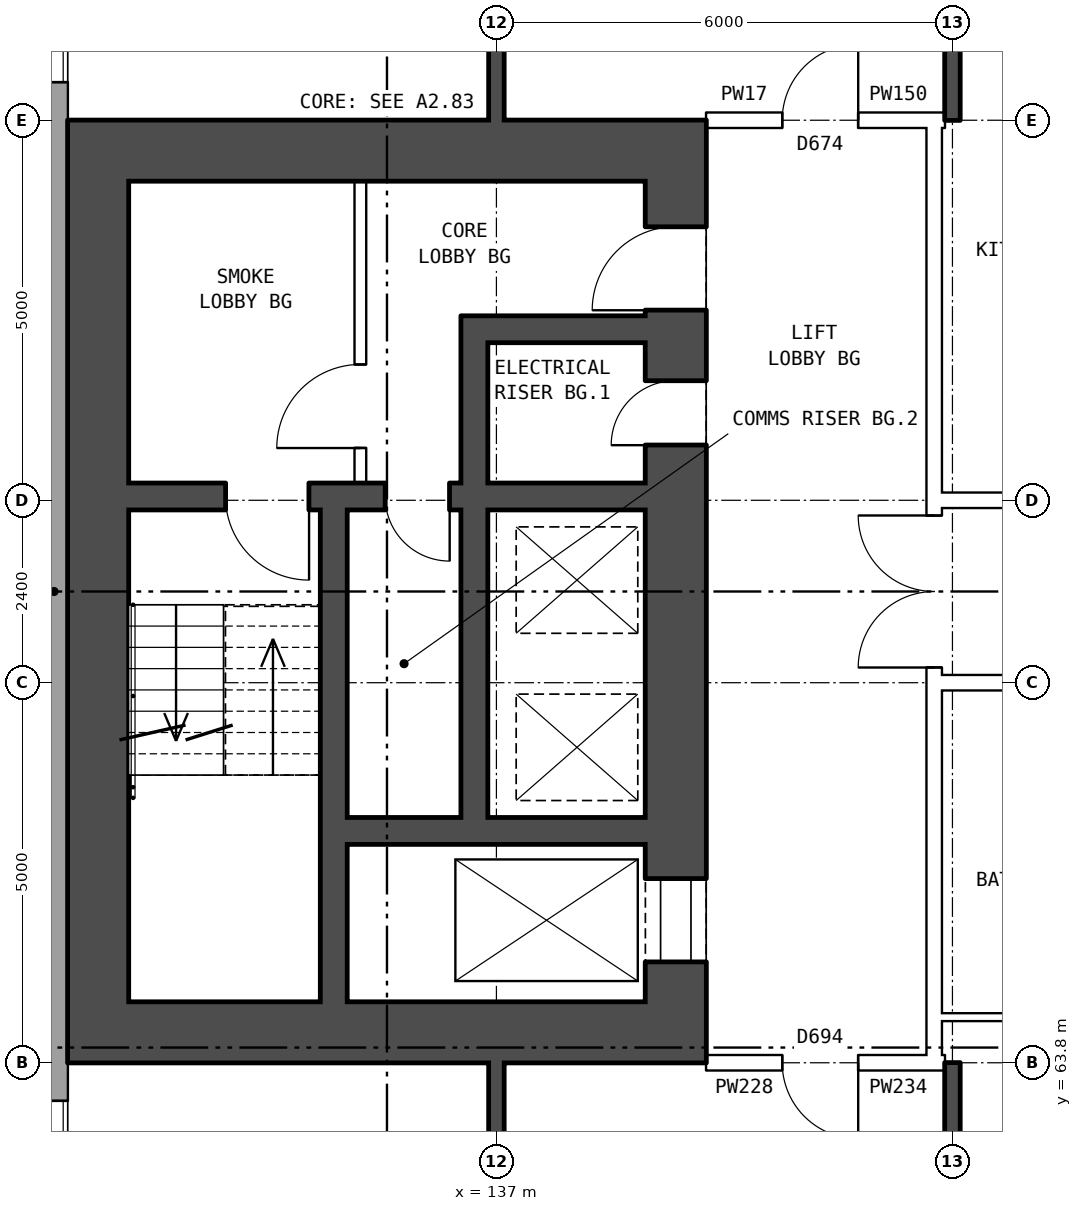
"""IFC4 building model, lengths in metres.
Left out: names, types, materials, properties, quantities, classifications, styles, units other than length and angle.
Written with IfcOpenShell. Run it as: python <this file> out.ifc"""

import sys

from ifc_helpers import new_model, si_unit, direction, frame, frame_2d, origin, place, context, subcontext, project, spatial, rectangle, extrude, element, fill, save


model = new_model("IFC4")
c1 = context("Model", 3, precision=1e-05, world=origin(), true_north=direction((0.0, 1.0)))
c2 = subcontext(c1, "Body", "Model", "MODEL_VIEW")
j1 = project(units=[si_unit("LENGTHUNIT", "METRE"), si_unit("PLANEANGLEUNIT", "RADIAN")], contexts=[c1])
p1 = place(None, origin())
s1 = spatial("IfcSite", under=j1, at=p1, CompositionType="ELEMENT")
p2 = place(p1, origin())
s2 = spatial("IfcBuilding", under=s1, at=p2, CompositionType="ELEMENT")
p3 = place(p2, frame((0.0, 0.0, 50.5)))
s3 = spatial("IfcBuildingStorey", under=s2, at=p3, CompositionType="ELEMENT", Elevation=50.5)
p4 = place(p3, frame((131.18, 82.925, 0.0), z_axis=(0.0, 0.0, 1.0), x_axis=(0.0, -1.0, 0.0)))
e1 = element("IfcWall", 1, at=p4, inside=s3, PredefinedType="STANDARD", context=c2, shape_type="SweptSolid", body=[
    extrude(rectangle(XDim=25.851, YDim=0.36, at=frame_2d((12.925, 0.0))), origin(), (0.0, 0.0, 1.0), 2.85),
])
p5 = place(p4, frame((1.625, 0.0, 0.8)))
e2 = element("IfcOpeningElement", 2, at=p5, cuts=e1, PredefinedType="OPENING", context=c2, shape_type="SweptSolid", body=[
    extrude(rectangle(XDim=1.6, YDim=1.8, at=frame_2d((0.8, 0.9))), frame((0.0, 0.19, 0.0), z_axis=(0.0, -1.0, 0.0), x_axis=(1.0, 0.0, 0.0)), (0.0, 0.0, 1.0), 0.38),
])
p6 = place(p4, frame((4.625, 0.0, 0.8)))
e3 = element("IfcOpeningElement", 3, at=p6, cuts=e1, PredefinedType="OPENING", context=c2, shape_type="SweptSolid", body=[
    extrude(rectangle(XDim=1.6, YDim=1.8, at=frame_2d((0.8, 0.9))), frame((0.0, 0.19, 0.0), z_axis=(0.0, -1.0, 0.0), x_axis=(1.0, 0.0, 0.0)), (0.0, 0.0, 1.0), 0.38),
])
p7 = place(p4, frame((19.625, 0.0, 0.8)))
e4 = element("IfcOpeningElement", 4, at=p7, cuts=e1, PredefinedType="OPENING", context=c2, shape_type="SweptSolid", body=[
    extrude(rectangle(XDim=1.6, YDim=1.8, at=frame_2d((0.8, 0.9))), frame((0.0, 0.19, 0.0), z_axis=(0.0, -1.0, 0.0), x_axis=(1.0, 0.0, 0.0)), (0.0, 0.0, 1.0), 0.38),
])
p8 = place(p4, frame((22.625, 0.0, 0.8)))
e5 = element("IfcOpeningElement", 5, at=p8, cuts=e1, PredefinedType="OPENING", context=c2, shape_type="SweptSolid", body=[
    extrude(rectangle(XDim=1.6, YDim=1.8, at=frame_2d((0.8, 0.9))), frame((0.0, 0.19, 0.0), z_axis=(0.0, -1.0, 0.0), x_axis=(1.0, 0.0, 0.0)), (0.0, 0.0, 1.0), 0.38),
])
p9 = place(p3, frame((139.36, 64.6, 0.0), z_axis=(0.0, 0.0, 1.0), x_axis=(0.0, 1.0, 0.0)))
e6 = element("IfcWall", 6, at=p9, inside=s3, PredefinedType="SHEAR", context=c2, shape_type="SweptSolid", body=[
    extrude(rectangle(XDim=10.8, YDim=0.8, at=frame_2d((5.4, 0.0))), origin(), (0.0, 0.0, 1.0), 2.85),
])
p10 = place(p9, frame((0.525, 0.0, 0.0)))
e7 = element("IfcOpeningElement", 7, at=p10, cuts=e6, PredefinedType="OPENING", context=c2, shape_type="SweptSolid", body=[
    extrude(rectangle(XDim=1.1, YDim=2.1, at=frame_2d((0.55, 1.05))), frame((0.0, 0.41, 0.0), z_axis=(0.0, -1.0, 0.0), x_axis=(1.0, 0.0, 0.0)), (0.0, 0.0, 1.0), 0.82),
])
p11 = place(p9, frame((9.1, 0.0, 0.0)))
e8 = element("IfcOpeningElement", 8, at=p11, cuts=e6, PredefinedType="OPENING", context=c2, shape_type="SweptSolid", body=[
    extrude(rectangle(XDim=1.1, YDim=2.1, at=frame_2d((0.55, 1.05))), frame((0.0, 0.41, 0.0), z_axis=(0.0, -1.0, 0.0), x_axis=(1.0, 0.0, 0.0)), (0.0, 0.0, 1.0), 0.82),
])
p12 = place(p9, frame((7.325, 0.0, 0.0)))
e9 = element("IfcOpeningElement", 9, at=p12, cuts=e6, PredefinedType="OPENING", context=c2, shape_type="SweptSolid", body=[
    extrude(rectangle(XDim=0.85, YDim=2.1, at=frame_2d((0.425, 1.05))), frame((0.0, 0.41, 0.0), z_axis=(0.0, -1.0, 0.0), x_axis=(1.0, 0.0, 0.0)), (0.0, 0.0, 1.0), 0.82),
])
p13 = place(p3, frame((131.76, 64.6, 0.0), z_axis=(0.0, 0.0, 1.0), x_axis=(0.0, 1.0, 0.0)))
e10 = element("IfcWall", 10, at=p13, inside=s3, PredefinedType="SHEAR", context=c2, shape_type="SweptSolid", body=[
    extrude(rectangle(XDim=10.8, YDim=0.8, at=frame_2d((5.4, 0.0))), origin(), (0.0, 0.0, 1.0), 2.85),
])
for number, where, z_axis, x_axis in (
    (11, (139.76, 64.2, 0.0), (0.0, 0.0, 1.0), (-1.0, 0.0, 0.0)),
    (12, (139.76, 75.8, 0.0), (0.0, 0.0, 1.0), (-1.0, 0.0, 0.0)),
):
    element("IfcWall", number, at=place(p3, frame(where, z_axis=z_axis, x_axis=x_axis)), inside=s3, PredefinedType="SHEAR", context=c2, shape_type="SweptSolid", body=[
        extrude(rectangle(XDim=8.4, YDim=0.8, at=frame_2d((4.2, 0.0))), origin(), (0.0, 0.0, 1.0), 2.85),
    ])
p14 = place(p3, frame((138.96, 66.85, 0.0), z_axis=(0.0, 0.0, 1.0), x_axis=(-1.0, 0.0, 0.0)))
e13 = element("IfcWall", 13, at=p14, inside=s3, PredefinedType="SHEAR", context=c2, shape_type="SweptSolid", body=[
    extrude(rectangle(XDim=3.925, YDim=0.35, at=frame_2d((1.962, 0.0))), origin(), (0.0, 0.0, 1.0), 2.85),
])
p15 = place(p3, frame((138.96, 71.25, 0.0), z_axis=(0.0, 0.0, 1.0), x_axis=(-1.0, 0.0, 0.0)))
e14 = element("IfcWall", 14, at=p15, inside=s3, PredefinedType="SHEAR", context=c2, shape_type="SweptSolid", body=[
    extrude(rectangle(XDim=6.8, YDim=0.35, at=frame_2d((3.4, 0.0))), origin(), (0.0, 0.0, 1.0), 2.85),
])
p16 = place(p15, frame((4.425, 0.0, 0.0)))
e15 = element("IfcOpeningElement", 15, at=p16, cuts=e14, PredefinedType="OPENING", context=c2, shape_type="SweptSolid", body=[
    extrude(rectangle(XDim=1.1, YDim=2.1, at=frame_2d((0.55, 1.05))), frame((0.0, 0.185, 0.0), z_axis=(0.0, -1.0, 0.0), x_axis=(1.0, 0.0, 0.0)), (0.0, 0.0, 1.0), 0.37),
])
p17 = place(p15, frame((2.575, 0.0, 0.0)))
e16 = element("IfcOpeningElement", 16, at=p17, cuts=e14, PredefinedType="OPENING", context=c2, shape_type="SweptSolid", body=[
    extrude(rectangle(XDim=0.85, YDim=2.1, at=frame_2d((0.425, 1.05))), frame((0.0, 0.185, 0.0), z_axis=(0.0, -1.0, 0.0), x_axis=(1.0, 0.0, 0.0)), (0.0, 0.0, 1.0), 0.37),
])
p18 = place(p3, frame((138.96, 73.45, 0.0), z_axis=(0.0, 0.0, 1.0), x_axis=(-1.0, 0.0, 0.0)))
e17 = element("IfcWall", 17, at=p18, inside=s3, PredefinedType="SHEAR", context=c2, shape_type="SweptSolid", body=[
    extrude(rectangle(XDim=2.075, YDim=0.35, at=frame_2d((1.038, 0.0))), origin(), (0.0, 0.0, 1.0), 2.85),
])
p19 = place(p3, frame((136.71, 67.025, 0.0), z_axis=(0.0, 0.0, 1.0), x_axis=(0.0, 1.0, 0.0)))
e18 = element("IfcWall", 18, at=p19, inside=s3, PredefinedType="SHEAR", context=c2, shape_type="SweptSolid", body=[
    extrude(rectangle(XDim=4.05, YDim=0.35, at=frame_2d((2.025, 0.0))), origin(), (0.0, 0.0, 1.0), 2.85),
])
p20 = place(p3, frame((136.71, 71.425, 0.0), z_axis=(0.0, 0.0, 1.0), x_axis=(0.0, 1.0, 0.0)))
e19 = element("IfcWall", 19, at=p20, inside=s3, PredefinedType="SHEAR", context=c2, shape_type="SweptSolid", body=[
    extrude(rectangle(XDim=2.2, YDim=0.35, at=frame_2d((1.1, 0.0))), origin(), (0.0, 0.0, 1.0), 2.85),
])
p21 = place(p3, frame((135.21, 71.425, 0.0), z_axis=(0.0, 0.0, 1.0), x_axis=(0.0, 1.0, 0.0)))
e20 = element("IfcWall", 20, at=p21, inside=s3, PredefinedType="PARTITIONING", context=c2, shape_type="SweptSolid", body=[
    extrude(rectangle(XDim=3.975, YDim=0.15, at=frame_2d((1.987, 0.0))), origin(), (0.0, 0.0, 1.0), 2.85),
])
p22 = place(p21, frame((0.462, 0.0, 0.0)))
e21 = element("IfcOpeningElement", 21, at=p22, cuts=e20, PredefinedType="OPENING", context=c2, shape_type="SweptSolid", body=[
    extrude(rectangle(XDim=1.1, YDim=2.1, at=frame_2d((0.55, 1.05))), frame((0.0, 0.085, 0.0), z_axis=(0.0, -1.0, 0.0), x_axis=(1.0, 0.0, 0.0)), (0.0, 0.0, 1.0), 0.17),
])
p23 = place(p3, frame((134.86, 64.6, 0.0), z_axis=(0.0, 0.0, 1.0), x_axis=(0.0, 1.0, 0.0)))
e22 = element("IfcWall", 22, at=p23, inside=s3, PredefinedType="SHEAR", context=c2, shape_type="SweptSolid", body=[
    extrude(rectangle(XDim=6.475, YDim=0.35, at=frame_2d((3.237, 0.0))), origin(), (0.0, 0.0, 1.0), 2.85),
])
p24 = place(p3, frame((142.76, 63.9, 0.0), z_axis=(0.0, 0.0, 1.0), x_axis=(0.0, 1.0, 0.0)))
e23 = element("IfcWall", 23, at=p24, inside=s3, PredefinedType="PARTITIONING", context=c2, shape_type="SweptSolid", body=[
    extrude(rectangle(XDim=12.2, YDim=0.2, at=frame_2d((6.1, 0.0))), origin(), (0.0, 0.0, 1.0), 2.85),
])
p25 = place(p24, frame((5.1, 0.0, 0.0)))
e24 = element("IfcOpeningElement", 24, at=p25, cuts=e23, PredefinedType="OPENING", context=c2, shape_type="SweptSolid", body=[
    extrude(rectangle(XDim=2.0, YDim=2.1, at=frame_2d((1.0, 1.05))), frame((0.0, 0.11, 0.0), z_axis=(0.0, -1.0, 0.0), x_axis=(1.0, 0.0, 0.0)), (0.0, 0.0, 1.0), 0.22),
])
p26 = place(p3, frame((139.76, 63.8, 0.0), z_axis=(0.0, 0.0, 1.0), x_axis=(1.0, 0.0, 0.0)))
e25 = element("IfcWall", 25, at=p26, inside=s3, PredefinedType="PARTITIONING", context=c2, shape_type="SweptSolid", body=[
    extrude(rectangle(XDim=3.0, YDim=0.2, at=frame_2d((1.5, 0.0))), origin(), (0.0, 0.0, 1.0), 2.85),
])
p27 = place(p26, frame((1.0, 0.0, 0.0)))
e26 = element("IfcOpeningElement", 26, at=p27, cuts=e25, PredefinedType="OPENING", context=c2, shape_type="SweptSolid", body=[
    extrude(rectangle(XDim=1.0, YDim=2.1, at=frame_2d((0.5, 1.05))), frame((0.0, 0.11, 0.0), z_axis=(0.0, -1.0, 0.0), x_axis=(1.0, 0.0, 0.0)), (0.0, 0.0, 1.0), 0.22),
])
p28 = place(p3, frame((142.76, 63.8, 0.0), z_axis=(0.0, 0.0, 1.0), x_axis=(1.0, 0.0, 0.0)))
e27 = element("IfcWall", 27, at=p28, inside=s3, PredefinedType="PARTITIONING", context=c2, shape_type="SweptSolid", body=[
    extrude(rectangle(XDim=0.14, YDim=0.2, at=frame_2d((0.07, 0.0))), origin(), (0.0, 0.0, 1.0), 2.85),
])
p29 = place(p3, frame((142.76, 64.4, 0.0), z_axis=(0.0, 0.0, 1.0), x_axis=(1.0, 0.0, 0.0)))
e28 = element("IfcWall", 28, at=p29, inside=s3, PredefinedType="PARTITIONING", context=c2, shape_type="SweptSolid", body=[
    extrude(rectangle(XDim=3.24, YDim=0.1, at=frame_2d((1.62, 0.0))), origin(), (0.0, 0.0, 1.0), 2.85),
])
p30 = place(p3, frame((142.76, 68.8, 0.0), z_axis=(0.0, 0.0, 1.0), x_axis=(1.0, 0.0, 0.0)))
e29 = element("IfcWall", 29, at=p30, inside=s3, PredefinedType="PARTITIONING", context=c2, shape_type="SweptSolid", body=[
    extrude(rectangle(XDim=14.48, YDim=0.2, at=frame_2d((7.24, 0.0))), origin(), (0.0, 0.0, 1.0), 2.85),
])
p31 = place(p30, frame((4.24, 0.0, 0.0)))
e30 = element("IfcOpeningElement", 30, at=p31, cuts=e29, PredefinedType="OPENING", context=c2, shape_type="SweptSolid", body=[
    extrude(rectangle(XDim=1.0, YDim=2.1, at=frame_2d((0.5, 1.05))), frame((0.0, 0.11, 0.0), z_axis=(0.0, -1.0, 0.0), x_axis=(1.0, 0.0, 0.0)), (0.0, 0.0, 1.0), 0.22),
])
p32 = place(p30, frame((10.24, 0.0, 0.0)))
e31 = element("IfcOpeningElement", 31, at=p32, cuts=e29, PredefinedType="OPENING", context=c2, shape_type="SweptSolid", body=[
    extrude(rectangle(XDim=1.0, YDim=2.1, at=frame_2d((0.5, 1.05))), frame((0.0, 0.11, 0.0), z_axis=(0.0, -1.0, 0.0), x_axis=(1.0, 0.0, 0.0)), (0.0, 0.0, 1.0), 0.22),
])
p33 = place(p3, frame((142.76, 71.2, 0.0), z_axis=(0.0, 0.0, 1.0), x_axis=(1.0, 0.0, 0.0)))
e32 = element("IfcWall", 32, at=p33, inside=s3, PredefinedType="PARTITIONING", context=c2, shape_type="SweptSolid", body=[
    extrude(rectangle(XDim=14.48, YDim=0.2, at=frame_2d((7.24, 0.0))), origin(), (0.0, 0.0, 1.0), 2.85),
])
p34 = place(p33, frame((1.12, 0.0, 0.0)))
e33 = element("IfcOpeningElement", 33, at=p34, cuts=e32, PredefinedType="OPENING", context=c2, shape_type="SweptSolid", body=[
    extrude(rectangle(XDim=1.0, YDim=2.1, at=frame_2d((0.5, 1.05))), frame((0.0, 0.11, 0.0), z_axis=(0.0, -1.0, 0.0), x_axis=(1.0, 0.0, 0.0)), (0.0, 0.0, 1.0), 0.22),
])
p35 = place(p33, frame((7.24, 0.0, 0.0)))
e34 = element("IfcOpeningElement", 34, at=p35, cuts=e32, PredefinedType="OPENING", context=c2, shape_type="SweptSolid", body=[
    extrude(rectangle(XDim=1.0, YDim=2.1, at=frame_2d((0.5, 1.05))), frame((0.0, 0.11, 0.0), z_axis=(0.0, -1.0, 0.0), x_axis=(1.0, 0.0, 0.0)), (0.0, 0.0, 1.0), 0.22),
])
p36 = place(p3, frame((139.76, 76.2, 0.0), z_axis=(0.0, 0.0, 1.0), x_axis=(1.0, 0.0, 0.0)))
e35 = element("IfcWall", 35, at=p36, inside=s3, PredefinedType="PARTITIONING", context=c2, shape_type="SweptSolid", body=[
    extrude(rectangle(XDim=3.0, YDim=0.2, at=frame_2d((1.5, 0.0))), origin(), (0.0, 0.0, 1.0), 2.85),
])
p37 = place(p36, frame((1.0, 0.0, 0.0)))
e36 = element("IfcOpeningElement", 36, at=p37, cuts=e35, PredefinedType="OPENING", context=c2, shape_type="SweptSolid", body=[
    extrude(rectangle(XDim=1.0, YDim=2.1, at=frame_2d((0.5, 1.05))), frame((0.0, 0.11, 0.0), z_axis=(0.0, -1.0, 0.0), x_axis=(1.0, 0.0, 0.0)), (0.0, 0.0, 1.0), 0.22),
])
p38 = place(p3, frame((142.76, 76.2, 0.0), z_axis=(0.0, 0.0, 1.0), x_axis=(1.0, 0.0, 0.0)))
e37 = element("IfcWall", 37, at=p38, inside=s3, PredefinedType="PARTITIONING", context=c2, shape_type="SweptSolid", body=[
    extrude(rectangle(XDim=0.14, YDim=0.2, at=frame_2d((0.07, 0.0))), origin(), (0.0, 0.0, 1.0), 2.85),
])
p39 = place(p3, frame((137.0, 54.36, 0.0), z_axis=(0.0, 0.0, 1.0), x_axis=(0.0, 1.0, 0.0)))
e38 = element("IfcWall", 38, at=p39, inside=s3, PredefinedType="SOLIDWALL", context=c2, shape_type="SweptSolid", body=[
    extrude(rectangle(XDim=9.44, YDim=0.2, at=frame_2d((4.72, 0.0))), origin(), (0.0, 0.0, 1.0), 2.85),
])
p40 = place(p39, frame((7.04, 0.0, 0.0)))
e39 = element("IfcOpeningElement", 39, at=p40, cuts=e38, PredefinedType="OPENING", context=c2, shape_type="SweptSolid", body=[
    extrude(rectangle(XDim=0.9, YDim=2.1, at=frame_2d((0.45, 1.05))), frame((0.0, 0.11, 0.0), z_axis=(0.0, -1.0, 0.0), x_axis=(1.0, 0.0, 0.0)), (0.0, 0.0, 1.0), 0.22),
])
p41 = place(p3, frame((137.0, 76.2, 0.0), z_axis=(0.0, 0.0, 1.0), x_axis=(0.0, 1.0, 0.0)))
e40 = element("IfcWall", 40, at=p41, inside=s3, PredefinedType="SOLIDWALL", context=c2, shape_type="SweptSolid", body=[
    extrude(rectangle(XDim=9.44, YDim=0.2, at=frame_2d((4.72, 0.0))), origin(), (0.0, 0.0, 1.0), 2.85),
])
p42 = place(p41, frame((1.2, 0.0, 0.0)))
e41 = element("IfcOpeningElement", 41, at=p42, cuts=e40, PredefinedType="OPENING", context=c2, shape_type="SweptSolid", body=[
    extrude(rectangle(XDim=0.9, YDim=2.1, at=frame_2d((0.45, 1.05))), frame((0.0, 0.11, 0.0), z_axis=(0.0, -1.0, 0.0), x_axis=(1.0, 0.0, 0.0)), (0.0, 0.0, 1.0), 0.22),
])
for number, where, z_axis, x_axis in (
    (42, (143.0, 54.36, 0.0), (0.0, 0.0, 1.0), (0.0, 1.0, 0.0)),
    (43, (143.0, 76.2, 0.0), (0.0, 0.0, 1.0), (0.0, 1.0, 0.0)),
):
    element("IfcWall", number, at=place(p3, frame(where, z_axis=z_axis, x_axis=x_axis)), inside=s3, PredefinedType="SOLIDWALL", context=c2, shape_type="SweptSolid", body=[
        extrude(rectangle(XDim=9.44, YDim=0.2, at=frame_2d((4.72, 0.0))), origin(), (0.0, 0.0, 1.0), 2.85),
    ])
p43 = place(p6, origin())
e44 = element("IfcWindow", 44, at=p43, inside=s3, PartitioningType="SINGLE_PANEL", PredefinedType="WINDOW", context=c2, shape_type="SweptSolid", body=[
    extrude(rectangle(XDim=1.6, YDim=1.8, at=frame_2d((0.8, 0.9))), frame((0.0, 0.15, 0.0), z_axis=(0.0, -1.0, 0.0), x_axis=(1.0, 0.0, 0.0)), (0.0, 0.0, 1.0), 0.06),
])
fill(e3, e44)
p44 = place(p7, origin())
e45 = element("IfcWindow", 45, at=p44, inside=s3, PartitioningType="SINGLE_PANEL", PredefinedType="WINDOW", context=c2, shape_type="SweptSolid", body=[
    extrude(rectangle(XDim=1.6, YDim=1.8, at=frame_2d((0.8, 0.9))), frame((0.0, 0.15, 0.0), z_axis=(0.0, -1.0, 0.0), x_axis=(1.0, 0.0, 0.0)), (0.0, 0.0, 1.0), 0.06),
])
fill(e4, e45)
p45 = place(p10, origin())
e46 = element("IfcDoor", 46, at=p45, inside=s3, OperationType="DOUBLE_DOOR_SLIDING", PredefinedType="DOOR", context=c2, shape_type="SweptSolid", body=[
    extrude(rectangle(XDim=1.1, YDim=2.1, at=frame_2d((0.55, 1.05))), frame((0.0, 0.385, 0.0), z_axis=(0.0, -1.0, 0.0), x_axis=(1.0, 0.0, 0.0)), (0.0, 0.0, 1.0), 0.05),
])
fill(e7, e46)
p46 = place(p11, origin())
e47 = element("IfcDoor", 47, at=p46, inside=s3, OperationType="SINGLE_SWING_LEFT", PredefinedType="DOOR", context=c2, shape_type="SweptSolid", body=[
    extrude(rectangle(XDim=1.1, YDim=2.1, at=frame_2d((0.55, 1.05))), frame((0.0, 0.385, 0.0), z_axis=(0.0, -1.0, 0.0), x_axis=(1.0, 0.0, 0.0)), (0.0, 0.0, 1.0), 0.05),
])
fill(e8, e47)
p47 = place(p22, origin())
e48 = element("IfcDoor", 48, at=p47, inside=s3, OperationType="SINGLE_SWING_LEFT", PredefinedType="DOOR", context=c2, shape_type="SweptSolid", body=[
    extrude(rectangle(XDim=1.1, YDim=2.1, at=frame_2d((0.55, 1.05))), frame((0.0, 0.025, 0.0), z_axis=(0.0, -1.0, 0.0), x_axis=(1.0, 0.0, 0.0)), (0.0, 0.0, 1.0), 0.05),
])
fill(e21, e48)
p48 = place(p16, origin())
e49 = element("IfcDoor", 49, at=p48, inside=s3, OperationType="SINGLE_SWING_LEFT", PredefinedType="DOOR", context=c2, shape_type="SweptSolid", body=[
    extrude(rectangle(XDim=1.1, YDim=2.1, at=frame_2d((0.55, 1.05))), frame((0.0, 0.025, 0.0), z_axis=(0.0, -1.0, 0.0), x_axis=(1.0, 0.0, 0.0)), (0.0, 0.0, 1.0), 0.05),
])
fill(e15, e49)
p49 = place(p12, origin())
e50 = element("IfcDoor", 50, at=p49, inside=s3, OperationType="SINGLE_SWING_LEFT", PredefinedType="DOOR", context=c2, shape_type="SweptSolid", body=[
    extrude(rectangle(XDim=0.85, YDim=2.1, at=frame_2d((0.425, 1.05))), frame((0.0, 0.385, 0.0), z_axis=(0.0, -1.0, 0.0), x_axis=(1.0, 0.0, 0.0)), (0.0, 0.0, 1.0), 0.05),
])
fill(e9, e50)
p50 = place(p17, origin())
e51 = element("IfcDoor", 51, at=p50, inside=s3, OperationType="SINGLE_SWING_LEFT", PredefinedType="DOOR", context=c2, shape_type="SweptSolid", body=[
    extrude(rectangle(XDim=0.85, YDim=2.1, at=frame_2d((0.425, 1.05))), frame((0.0, 0.025, 0.0), z_axis=(0.0, -1.0, 0.0), x_axis=(1.0, 0.0, 0.0)), (0.0, 0.0, 1.0), 0.05),
])
fill(e16, e51)
p51 = place(p25, origin())
e52 = element("IfcDoor", 52, at=p51, inside=s3, OperationType="DOUBLE_DOOR_SINGLE_SWING", PredefinedType="DOOR", context=c2, shape_type="SweptSolid", body=[
    extrude(rectangle(XDim=2.0, YDim=2.1, at=frame_2d((1.0, 1.05))), frame((0.0, 0.025, 0.0), z_axis=(0.0, -1.0, 0.0), x_axis=(1.0, 0.0, 0.0)), (0.0, 0.0, 1.0), 0.05),
])
fill(e24, e52)
p52 = place(p27, frame((1.0, 0.0, 0.0), z_axis=(0.0, 0.0, 1.0), x_axis=(-1.0, 0.0, 0.0)))
e53 = element("IfcDoor", 53, at=p52, inside=s3, OperationType="SINGLE_SWING_LEFT", PredefinedType="DOOR", context=c2, shape_type="SweptSolid", body=[
    extrude(rectangle(XDim=1.0, YDim=2.1, at=frame_2d((0.5, 1.05))), frame((0.0, 0.025, 0.0), z_axis=(0.0, -1.0, 0.0), x_axis=(1.0, 0.0, 0.0)), (0.0, 0.0, 1.0), 0.05),
])
fill(e26, e53)
p53 = place(p37, origin())
e54 = element("IfcDoor", 54, at=p53, inside=s3, OperationType="SINGLE_SWING_RIGHT", PredefinedType="DOOR", context=c2, shape_type="SweptSolid", body=[
    extrude(rectangle(XDim=1.0, YDim=2.1, at=frame_2d((0.5, 1.05))), frame((0.0, 0.025, 0.0), z_axis=(0.0, -1.0, 0.0), x_axis=(1.0, 0.0, 0.0)), (0.0, 0.0, 1.0), 0.05),
])
fill(e36, e54)
save(model, sys.argv[1])
